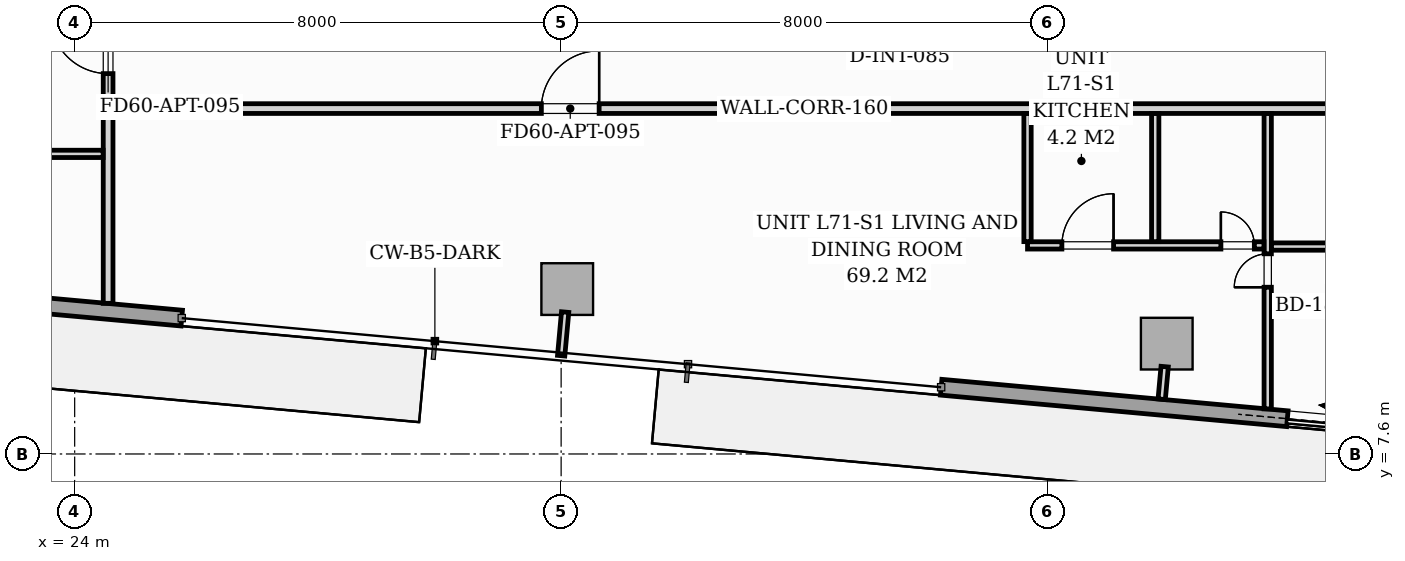
"""IFC4 building model, lengths in metres.
Left out: names, types, materials, properties, quantities, classifications, styles, units other than length and angle.
Written with IfcOpenShell. Run it as: python <this file> out.ifc"""

import sys

from ifc_helpers import new_model, si_unit, direction, frame, frame_2d, origin, origin_2d, place, context, subcontext, project, spatial, rectangle, extrude, source, transform, mapped, element, fill, save


model = new_model("IFC4")
c1 = context("Model", 3, precision=1e-05, world=origin(), true_north=direction((0.0, 1.0)))
c2 = subcontext(c1, "Body", "Model", "MODEL_VIEW")
j1 = project(units=[si_unit("LENGTHUNIT", "METRE"), si_unit("PLANEANGLEUNIT", "RADIAN")], contexts=[c1])
p1 = place(None, origin())
s1 = spatial("IfcSite", under=j1, at=p1, CompositionType="ELEMENT")
p2 = place(p1, origin())
s2 = spatial("IfcBuilding", under=s1, at=p2, CompositionType="ELEMENT")
p3 = place(p2, frame((0.0, 0.0, 246.3)))
s3 = spatial("IfcBuildingStorey", under=s2, at=p3, CompositionType="ELEMENT", Elevation=246.3)
m1 = source(origin(), c2, "Body", "SweptSolid", [
    extrude(rectangle(XDim=0.85, YDim=0.85, at=origin_2d()), origin(), (0.0, 0.0, 1.0), 3.296),
])
for number, where, z_axis, x_axis in (
    (1, (32.1, 10.312, 0.002), (0.0, 0.0, 1.0), (0.996, -0.091, 0.0)),
    (2, (41.96, 9.415, 0.002), (0.0, 0.0, 1.0), (0.996, -0.091, 0.0)),
):
    element("IfcColumn", number, at=place(p3, frame(where, z_axis=z_axis, x_axis=x_axis)), inside=s3, PredefinedType="COLUMN", context=c2, shape_type="MappedRepresentation", body=[
        mapped(m1, transform((0.0, 0.0, 0.0), scale=1.0)),
    ])
p4 = place(p3, frame((52.819, 7.372, 0.0), z_axis=(0.0, 0.0, 1.0), x_axis=(-0.995884447498, 0.090632043071, 0.0)))
e3 = element("IfcWall", 3, at=p4, inside=s3, PredefinedType="STANDARD", context=c2, shape_type="SweptSolid", body=[
    extrude(rectangle(XDim=14.63, YDim=0.26, at=frame_2d((7.315, 0.0))), origin(), (0.0, 0.0, 1.0), 3.04),
])
p5 = place(p4, frame((7.113, 0.0, 0.0)))
e4 = element("IfcOpeningElement", 4, at=p5, cuts=e3, PredefinedType="OPENING", context=c2, shape_type="SweptSolid", body=[
    extrude(rectangle(XDim=1.8, YDim=2.06, at=frame_2d((0.9, 1.03))), frame((0.0, 0.14, 0.0), z_axis=(0.0, -1.0, 0.0), x_axis=(1.0, 0.0, 0.0)), (0.0, 0.0, 1.0), 0.28),
])
p6 = place(p4, frame((2.5, 0.0, 0.65)))
e5 = element("IfcOpeningElement", 5, at=p6, cuts=e3, PredefinedType="OPENING", context=c2, shape_type="SweptSolid", body=[
    extrude(rectangle(XDim=1.6, YDim=1.5, at=frame_2d((0.8, 0.75))), frame((0.0, 0.14, 0.0), z_axis=(0.0, -1.0, 0.0), x_axis=(1.0, 0.0, 0.0)), (0.0, 0.0, 1.0), 0.28),
])
p7 = place(p3, frame((25.761, 9.834, 0.0), z_axis=(0.0, 0.0, 1.0), x_axis=(-0.995884584572, 0.090630536861, 0.0)))
e6 = element("IfcWall", 6, at=p7, inside=s3, PredefinedType="STANDARD", context=c2, shape_type="SweptSolid", body=[
    extrude(rectangle(XDim=14.63, YDim=0.26, at=frame_2d((7.315, 0.0))), origin(), (0.0, 0.0, 1.0), 3.04),
])
p8 = place(p7, frame((6.09, 0.0, 0.0)))
e7 = element("IfcOpeningElement", 7, at=p8, cuts=e6, PredefinedType="OPENING", context=c2, shape_type="SweptSolid", body=[
    extrude(rectangle(XDim=1.8, YDim=2.06, at=frame_2d((0.9, 1.03))), frame((0.0, 0.14, 0.0), z_axis=(0.0, -1.0, 0.0), x_axis=(1.0, 0.0, 0.0)), (0.0, 0.0, 1.0), 0.28),
])
p9 = place(p7, frame((8.35, 0.0, 0.65)))
e8 = element("IfcOpeningElement", 8, at=p9, cuts=e6, PredefinedType="OPENING", context=c2, shape_type="SweptSolid", body=[
    extrude(rectangle(XDim=1.6, YDim=1.5, at=frame_2d((0.8, 0.75))), frame((0.0, 0.14, 0.0), z_axis=(0.0, -1.0, 0.0), x_axis=(1.0, 0.0, 0.0)), (0.0, 0.0, 1.0), 0.28),
])
p10 = place(p3, frame((24.55, 13.28, 0.0), z_axis=(0.0, 0.0, 1.0), x_axis=(1.0, 0.0, 0.0)))
e9 = element("IfcWall", 9, at=p10, inside=s3, PredefinedType="PARTITIONING", context=c2, shape_type="SweptSolid", body=[
    extrude(rectangle(XDim=22.9, YDim=0.16, at=frame_2d((11.45, 0.0))), origin(), (0.0, 0.0, 1.0), 2.556),
])
p11 = place(p10, frame((7.125, 0.0, 0.0)))
e10 = element("IfcOpeningElement", 10, at=p11, cuts=e9, PredefinedType="OPENING", context=c2, shape_type="SweptSolid", body=[
    extrude(rectangle(XDim=0.95, YDim=2.06, at=frame_2d((0.475, 1.03))), frame((0.0, 0.09, 0.0), z_axis=(0.0, -1.0, 0.0), x_axis=(1.0, 0.0, 0.0)), (0.0, 0.0, 1.0), 0.18),
])
p12 = place(p3, frame((24.55, 10.077, 0.0), z_axis=(0.0, 0.0, 1.0), x_axis=(0.0, 1.0, 0.0)))
e11 = element("IfcWall", 11, at=p12, inside=s3, PredefinedType="PARTITIONING", context=c2, shape_type="SweptSolid", body=[
    extrude(rectangle(XDim=3.121, YDim=0.16, at=frame_2d((1.561, 0.0))), origin(), (0.0, 0.0, 1.0), 3.04),
])
p13 = place(p3, frame((24.55, 13.362, 0.0), z_axis=(0.0, 0.0, 1.0), x_axis=(0.0, 1.0, 0.0)))
e12 = element("IfcWall", 12, at=p13, inside=s3, PredefinedType="PARTITIONING", context=c2, shape_type="SweptSolid", body=[
    extrude(rectangle(XDim=7.288, YDim=0.16, at=frame_2d((3.644, 0.0))), origin(), (0.0, 0.0, 1.0), 3.04),
])
p14 = place(p13, frame((0.493, 0.0, 0.0)))
e13 = element("IfcOpeningElement", 13, at=p14, cuts=e12, PredefinedType="OPENING", context=c2, shape_type="SweptSolid", body=[
    extrude(rectangle(XDim=0.95, YDim=2.06, at=frame_2d((0.475, 1.03))), frame((0.0, 0.09, 0.0), z_axis=(0.0, -1.0, 0.0), x_axis=(1.0, 0.0, 0.0)), (0.0, 0.0, 1.0), 0.18),
])
p15 = place(p13, frame((5.623, 0.0, 0.0)))
e14 = element("IfcOpeningElement", 14, at=p15, cuts=e12, PredefinedType="OPENING", context=c2, shape_type="SweptSolid", body=[
    extrude(rectangle(XDim=0.95, YDim=2.06, at=frame_2d((0.475, 1.03))), frame((0.0, 0.09, 0.0), z_axis=(0.0, -1.0, 0.0), x_axis=(1.0, 0.0, 0.0)), (0.0, 0.0, 1.0), 0.18),
])
p16 = place(p3, frame((43.62, 8.342, 0.0), z_axis=(0.0, 0.0, 1.0), x_axis=(0.0, 1.0, 0.0)))
e15 = element("IfcWall", 15, at=p16, inside=s3, PredefinedType="PARTITIONING", context=c2, shape_type="SweptSolid", body=[
    extrude(rectangle(XDim=4.856, YDim=0.12, at=frame_2d((2.428, 0.0))), origin(), (0.0, 0.0, 1.0), 3.04),
])
p17 = place(p16, frame((2.0, 0.0, 0.0)))
e16 = element("IfcOpeningElement", 16, at=p17, cuts=e15, PredefinedType="OPENING", context=c2, shape_type="SweptSolid", body=[
    extrude(rectangle(XDim=0.55, YDim=2.0, at=frame_2d((0.275, 1.0))), frame((0.0, 0.07, 0.0), z_axis=(0.0, -1.0, 0.0), x_axis=(1.0, 0.0, 0.0)), (0.0, 0.0, 1.0), 0.14),
])
p18 = place(p3, frame((39.67, 11.03, 0.0), z_axis=(0.0, 0.0, 1.0), x_axis=(1.0, 0.0, 0.0)))
e17 = element("IfcWall", 17, at=p18, inside=s3, PredefinedType="PARTITIONING", context=c2, shape_type="SweptSolid", body=[
    extrude(rectangle(XDim=3.888, YDim=0.12, at=frame_2d((1.944, 0.0))), origin(), (0.0, 0.0, 1.0), 3.04),
])
p19 = place(p18, frame((0.565, 0.0, 0.0)))
e18 = element("IfcOpeningElement", 18, at=p19, cuts=e17, PredefinedType="OPENING", context=c2, shape_type="SweptSolid", body=[
    extrude(rectangle(XDim=0.85, YDim=2.05, at=frame_2d((0.425, 1.025))), frame((0.0, 0.07, 0.0), z_axis=(0.0, -1.0, 0.0), x_axis=(1.0, 0.0, 0.0)), (0.0, 0.0, 1.0), 0.14),
])
p20 = place(p18, frame((3.18, 0.0, 0.0)))
e19 = element("IfcOpeningElement", 19, at=p20, cuts=e17, PredefinedType="OPENING", context=c2, shape_type="SweptSolid", body=[
    extrude(rectangle(XDim=0.55, YDim=2.0, at=frame_2d((0.275, 1.0))), frame((0.0, 0.07, 0.0), z_axis=(0.0, -1.0, 0.0), x_axis=(1.0, 0.0, 0.0)), (0.0, 0.0, 1.0), 0.14),
])
for number, where, z_axis, x_axis in (
    (20, (41.77, 11.092, 0.0), (0.0, 0.0, 1.0), (0.0, 1.0, 0.0)),
    (21, (39.67, 11.092, 0.0), (0.0, 0.0, 1.0), (0.0, 1.0, 0.0)),
):
    element("IfcWall", number, at=place(p3, frame(where, z_axis=z_axis, x_axis=x_axis)), inside=s3, PredefinedType="PARTITIONING", context=c2, shape_type="SweptSolid", body=[
        extrude(rectangle(XDim=2.106, YDim=0.12, at=frame_2d((1.053, 0.0))), origin(), (0.0, 0.0, 1.0), 3.04),
    ])
p21 = place(p3, frame((43.682, 11.011, 0.0), z_axis=(0.0, 0.0, 1.0), x_axis=(1.0, 0.0, 0.0)))
e22 = element("IfcWall", 22, at=p21, inside=s3, PredefinedType="PARTITIONING", context=c2, shape_type="SweptSolid", body=[
    extrude(rectangle(XDim=3.686, YDim=0.12, at=frame_2d((1.843, 0.0))), origin(), (0.0, 0.0, 1.0), 3.04),
])
p22 = place(p21, frame((1.413, 0.0, 0.0)))
e23 = element("IfcOpeningElement", 23, at=p22, cuts=e22, PredefinedType="OPENING", context=c2, shape_type="SweptSolid", body=[
    extrude(rectangle(XDim=0.8, YDim=2.02, at=frame_2d((0.4, 1.01))), frame((0.0, 0.07, 0.0), z_axis=(0.0, -1.0, 0.0), x_axis=(1.0, 0.0, 0.0)), (0.0, 0.0, 1.0), 0.14),
])
p23 = place(p3, frame((13.643, 12.535, 0.0), z_axis=(0.0, 0.0, 1.0), x_axis=(1.0, 0.0, 0.0)))
e24 = element("IfcWall", 24, at=p23, inside=s3, PredefinedType="PARTITIONING", context=c2, shape_type="SweptSolid", body=[
    extrude(rectangle(XDim=10.825, YDim=0.12, at=frame_2d((5.413, 0.0))), origin(), (0.0, 0.0, 1.0), 3.04),
])
p24 = place(p23, frame((4.988, 0.0, 0.0)))
e25 = element("IfcOpeningElement", 25, at=p24, cuts=e24, PredefinedType="OPENING", context=c2, shape_type="SweptSolid", body=[
    extrude(rectangle(XDim=0.85, YDim=2.05, at=frame_2d((0.425, 1.025))), frame((0.0, 0.07, 0.0), z_axis=(0.0, -1.0, 0.0), x_axis=(1.0, 0.0, 0.0)), (0.0, 0.0, 1.0), 0.14),
])
p25 = place(p3, frame((32.066, 9.933, 0.0), z_axis=(0.0, 0.0, 1.0), x_axis=(-0.090872036342, -0.995862577373, 0.0)))
e26 = element("IfcWall", 26, at=p25, inside=s3, PredefinedType="PARTITIONING", context=c2, shape_type="SweptSolid", body=[
    extrude(rectangle(XDim=0.72, YDim=0.12, at=frame_2d((0.36, 0.0))), origin(), (0.0, 0.0, 1.0), 3.04),
])
p26 = place(p3, frame((41.925, 9.036, 0.0), z_axis=(0.0, 0.0, 1.0), x_axis=(-0.090740281653, -0.995874591144, 0.0)))
e27 = element("IfcWall", 27, at=p26, inside=s3, PredefinedType="PARTITIONING", context=c2, shape_type="SweptSolid", body=[
    extrude(rectangle(XDim=0.538, YDim=0.12, at=frame_2d((0.269, 0.0))), origin(), (0.0, 0.0, 1.0), 3.04),
])
m2 = source(origin(), c2, "Body", "SweptSolid", [
    extrude(rectangle(XDim=1.8, YDim=2.06, at=frame_2d((0.9, 1.03))), frame((0.0, 0.025, 0.0), z_axis=(0.0, -1.0, 0.0), x_axis=(1.0, 0.0, 0.0)), (0.0, 0.0, 1.0), 0.05),
])
p27 = place(p5, origin())
e28 = element("IfcDoor", 28, at=p27, inside=s3, OperationType="SLIDING_TO_RIGHT", PredefinedType="DOOR", context=c2, shape_type="MappedRepresentation", body=[
    mapped(m2, transform((0.0, 0.0, 0.0), scale=1.0)),
])
fill(e4, e28)
m3 = source(origin(), c2, "Body", "SweptSolid", [
    extrude(rectangle(XDim=0.95, YDim=2.06, at=frame_2d((0.475, 1.03))), frame((0.0, 0.025, 0.0), z_axis=(0.0, -1.0, 0.0), x_axis=(1.0, 0.0, 0.0)), (0.0, 0.0, 1.0), 0.05),
])
p28 = place(p11, origin())
e29 = element("IfcDoor", 29, at=p28, inside=s3, OperationType="SINGLE_SWING_RIGHT", PredefinedType="DOOR", context=c2, shape_type="MappedRepresentation", body=[
    mapped(m3, transform((0.0, 0.0, 0.0), scale=1.0)),
])
fill(e10, e29)
m4 = source(origin(), c2, "Body", "SweptSolid", [
    extrude(rectangle(XDim=0.55, YDim=2.0, at=frame_2d((0.275, 1.0))), frame((0.0, 0.025, 0.0), z_axis=(0.0, -1.0, 0.0), x_axis=(1.0, 0.0, 0.0)), (0.0, 0.0, 1.0), 0.05),
])
p29 = place(p17, origin())
e30 = element("IfcDoor", 30, at=p29, inside=s3, OperationType="SINGLE_SWING_LEFT", PredefinedType="DOOR", context=c2, shape_type="MappedRepresentation", body=[
    mapped(m4, transform((0.0, 0.0, 0.0), scale=1.0)),
])
fill(e16, e30)
m5 = source(origin(), c2, "Body", "SweptSolid", [
    extrude(rectangle(XDim=0.85, YDim=2.05, at=frame_2d((0.425, 1.025))), frame((0.0, 0.025, 0.0), z_axis=(0.0, -1.0, 0.0), x_axis=(1.0, 0.0, 0.0)), (0.0, 0.0, 1.0), 0.05),
])
p30 = place(p19, origin())
e31 = element("IfcDoor", 31, at=p30, inside=s3, OperationType="SINGLE_SWING_RIGHT", PredefinedType="DOOR", context=c2, shape_type="MappedRepresentation", body=[
    mapped(m5, transform((0.0, 0.0, 0.0), scale=1.0)),
])
fill(e18, e31)
p31 = place(p20, origin())
e32 = element("IfcDoor", 32, at=p31, inside=s3, OperationType="SINGLE_SWING_LEFT", PredefinedType="DOOR", context=c2, shape_type="MappedRepresentation", body=[
    mapped(m4, transform((0.0, 0.0, 0.0), scale=1.0)),
])
fill(e19, e32)
p32 = place(p14, origin())
e33 = element("IfcDoor", 33, at=p32, inside=s3, OperationType="SINGLE_SWING_RIGHT", PredefinedType="DOOR", context=c2, shape_type="MappedRepresentation", body=[
    mapped(m3, transform((0.0, 0.0, 0.0), scale=1.0)),
])
fill(e13, e33)
save(model, sys.argv[1])
